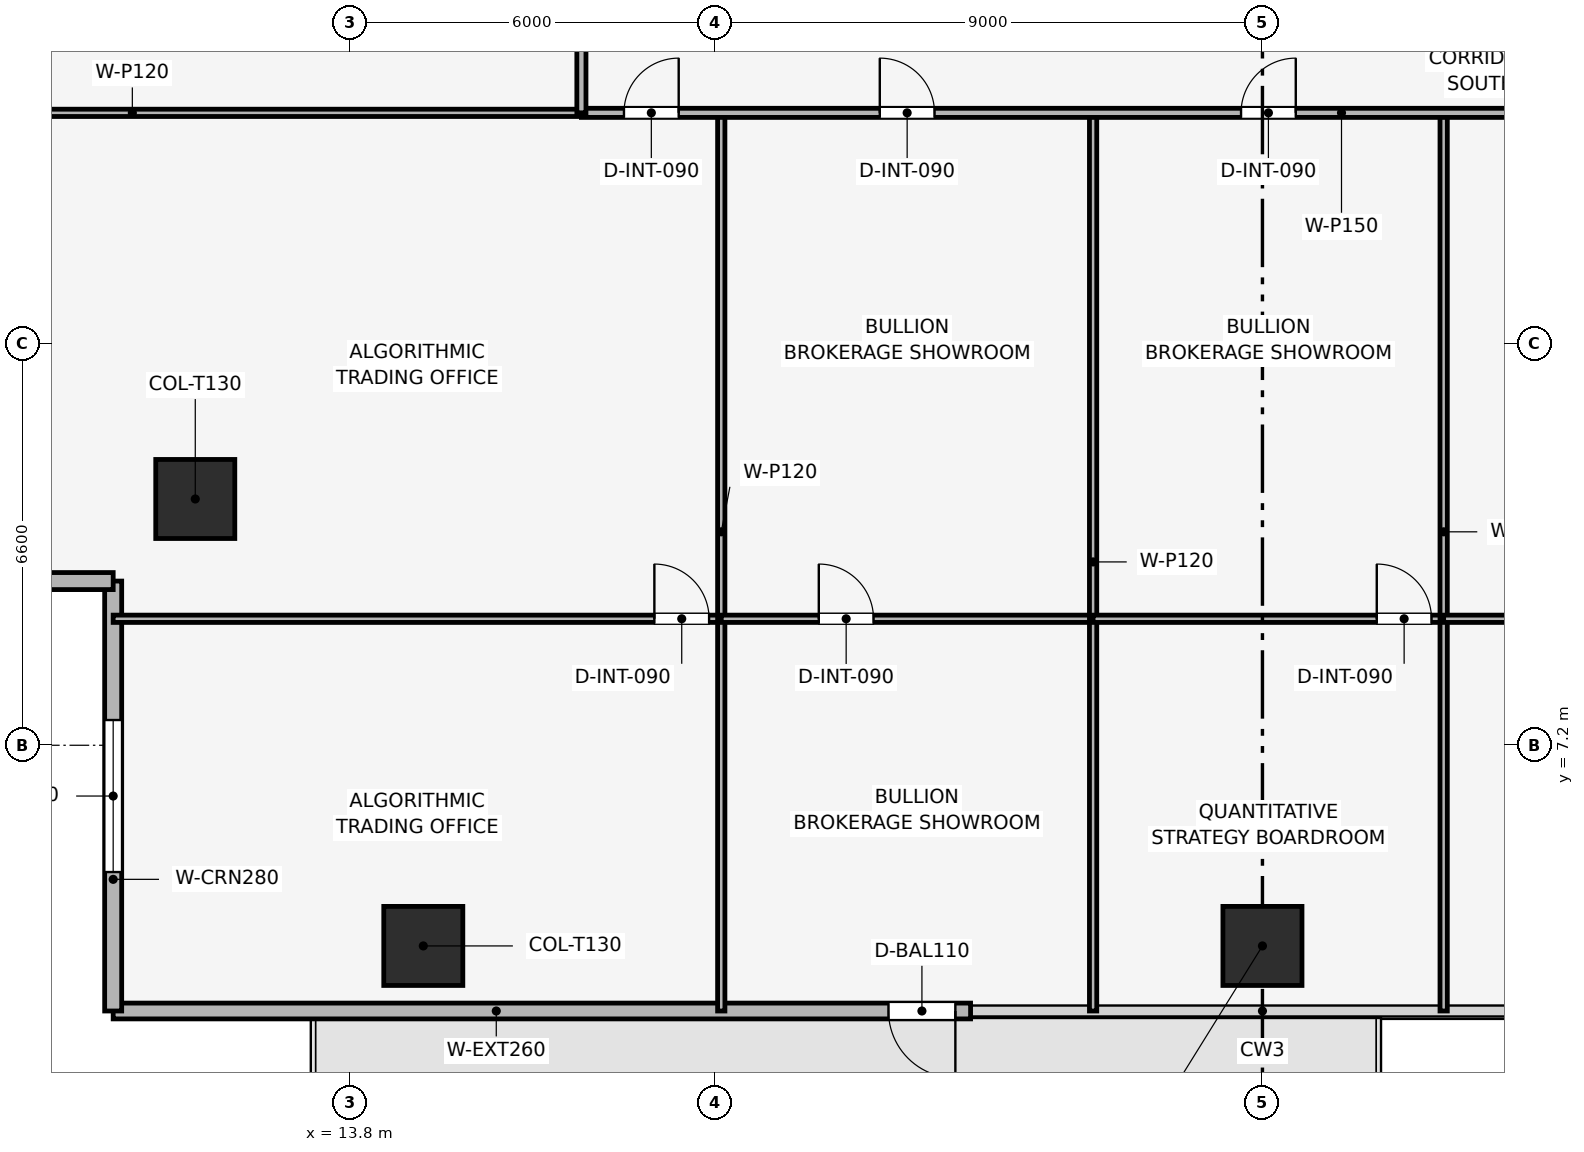
"""IFC4 building model, lengths in metres.
Left out: names, types, materials, properties, quantities, classifications, styles, units other than length and angle.
Written with IfcOpenShell. Run it as: python <this file> out.ifc"""

import sys

from ifc_helpers import new_model, si_unit, direction, frame, frame_2d, origin, origin_2d, place, context, subcontext, project, spatial, rectangle, extrude, element, fill, save


model = new_model("IFC4")
c1 = context("Model", 3, precision=1e-05, world=origin(), true_north=direction((0.0, 1.0)))
c2 = subcontext(c1, "Body", "Model", "MODEL_VIEW")
j1 = project(units=[si_unit("LENGTHUNIT", "METRE"), si_unit("PLANEANGLEUNIT", "RADIAN")], contexts=[c1])
p1 = place(None, origin())
s1 = spatial("IfcSite", under=j1, at=p1, CompositionType="ELEMENT")
p2 = place(p1, origin())
s2 = spatial("IfcBuilding", under=s1, at=p2, CompositionType="ELEMENT")
p3 = place(p2, frame((0.0, 0.0, 125.1)))
s3 = spatial("IfcBuildingStorey", under=s2, at=p3, CompositionType="ELEMENT", Elevation=125.1)
for number, where, z_axis, x_axis in (
    (1, (15.0, 3.9, 0.003), (0.0, 0.0, 1.0), (1.0, 0.0, 0.0)),
    (2, (28.8, 3.9, 0.003), (0.0, 0.0, 1.0), (1.0, 0.0, 0.0)),
    (3, (11.25, 11.25, 0.003), (0.0, 0.0, 1.0), (1.0, 0.0, 0.0)),
):
    element("IfcColumn", number, at=place(p3, frame(where, z_axis=z_axis, x_axis=x_axis)), inside=s3, PredefinedType="COLUMN", context=c2, shape_type="SweptSolid", body=[
        extrude(rectangle(XDim=1.3, YDim=1.3, at=origin_2d()), origin(), (0.0, 0.0, 1.0), 3.644),
    ])
p4 = place(p3, frame((24.0, 2.83, 0.0), z_axis=(0.0, 0.0, 1.0), x_axis=(-1.0, 0.0, 0.0)))
e4 = element("IfcWall", 4, at=p4, inside=s3, PredefinedType="SOLIDWALL", context=c2, shape_type="SweptSolid", body=[
    extrude(rectangle(XDim=14.1, YDim=0.26, at=frame_2d((7.05, 0.0))), origin(), (0.0, 0.0, 1.0), 3.65),
])
p5 = place(p4, frame((0.25, 0.0, 0.0)))
e5 = element("IfcOpeningElement", 5, at=p5, cuts=e4, PredefinedType="OPENING", context=c2, shape_type="SweptSolid", body=[
    extrude(rectangle(XDim=1.1, YDim=2.2, at=frame_2d((0.55, 1.1))), frame((0.0, 0.14, 0.0), z_axis=(0.0, -1.0, 0.0), x_axis=(1.0, 0.0, 0.0)), (0.0, 0.0, 1.0), 0.28),
])
p6 = place(p3, frame((9.9, 2.83, 0.0), z_axis=(0.0, 0.0, 1.0), x_axis=(0.0, 1.0, 0.0)))
e6 = element("IfcWall", 6, at=p6, inside=s3, PredefinedType="SOLIDWALL", context=c2, shape_type="SweptSolid", body=[
    extrude(rectangle(XDim=7.07, YDim=0.28, at=frame_2d((3.535, 0.0))), origin(), (0.0, 0.0, 1.0), 3.65),
])
p7 = place(p6, frame((2.285, 0.0, 0.9)))
e7 = element("IfcOpeningElement", 7, at=p7, cuts=e6, PredefinedType="OPENING", context=c2, shape_type="SweptSolid", body=[
    extrude(rectangle(XDim=2.5, YDim=1.9, at=frame_2d((1.25, 0.95))), frame((0.0, 0.15, 0.0), z_axis=(0.0, -1.0, 0.0), x_axis=(1.0, 0.0, 0.0)), (0.0, 0.0, 1.0), 0.3),
])
p8 = place(p3, frame((9.9, 9.9, 0.0), z_axis=(0.0, 0.0, 1.0), x_axis=(-1.0, 0.0, 0.0)))
e8 = element("IfcWall", 8, at=p8, inside=s3, PredefinedType="SOLIDWALL", context=c2, shape_type="SweptSolid", body=[
    extrude(rectangle(XDim=7.07, YDim=0.28, at=frame_2d((3.535, 0.0))), origin(), (0.0, 0.0, 1.0), 3.65),
])
p9 = place(p8, frame((2.285, 0.0, 0.9)))
e9 = element("IfcOpeningElement", 9, at=p9, cuts=e8, PredefinedType="OPENING", context=c2, shape_type="SweptSolid", body=[
    extrude(rectangle(XDim=2.5, YDim=1.9, at=frame_2d((1.25, 0.95))), frame((0.0, 0.15, 0.0), z_axis=(0.0, -1.0, 0.0), x_axis=(1.0, 0.0, 0.0)), (0.0, 0.0, 1.0), 0.3),
])
p10 = place(p3, frame((9.9, 9.28, 0.0), z_axis=(0.0, 0.0, 1.0), x_axis=(1.0, 0.0, 0.0)))
e10 = element("IfcWall", 10, at=p10, inside=s3, PredefinedType="PARTITIONING", context=c2, shape_type="SweptSolid", body=[
    extrude(rectangle(XDim=10.0, YDim=0.12, at=frame_2d((5.0, 0.0))), origin(), (0.0, 0.0, 1.0), 3.035),
])
p11 = place(p10, frame((8.9, 0.0, 0.0)))
e11 = element("IfcOpeningElement", 11, at=p11, cuts=e10, PredefinedType="OPENING", context=c2, shape_type="SweptSolid", body=[
    extrude(rectangle(XDim=0.9, YDim=2.1, at=frame_2d((0.45, 1.05))), frame((0.0, 0.07, 0.0), z_axis=(0.0, -1.0, 0.0), x_axis=(1.0, 0.0, 0.0)), (0.0, 0.0, 1.0), 0.14),
])
p12 = place(p3, frame((19.9, 2.83, 0.0), z_axis=(0.0, 0.0, 1.0), x_axis=(0.0, 1.0, 0.0)))
e12 = element("IfcWall", 12, at=p12, inside=s3, PredefinedType="PARTITIONING", context=c2, shape_type="SweptSolid", body=[
    extrude(rectangle(XDim=14.77, YDim=0.12, at=frame_2d((7.385, 0.0))), origin(), (0.0, 0.0, 1.0), 3.035),
])
p13 = place(p3, frame((19.9, 9.28, 0.0), z_axis=(0.0, 0.0, 1.0), x_axis=(1.0, 0.0, 0.0)))
e13 = element("IfcWall", 13, at=p13, inside=s3, PredefinedType="PARTITIONING", context=c2, shape_type="SweptSolid", body=[
    extrude(rectangle(XDim=6.115, YDim=0.12, at=frame_2d((3.058, 0.0))), origin(), (0.0, 0.0, 1.0), 3.185),
])
p14 = place(p13, frame((1.604, 0.0, 0.0)))
e14 = element("IfcOpeningElement", 14, at=p14, cuts=e13, PredefinedType="OPENING", context=c2, shape_type="SweptSolid", body=[
    extrude(rectangle(XDim=0.9, YDim=2.1, at=frame_2d((0.45, 1.05))), frame((0.0, 0.07, 0.0), z_axis=(0.0, -1.0, 0.0), x_axis=(1.0, 0.0, 0.0)), (0.0, 0.0, 1.0), 0.14),
])
p15 = place(p3, frame((26.015, 2.83, 0.0), z_axis=(0.0, 0.0, 1.0), x_axis=(0.0, 1.0, 0.0)))
e15 = element("IfcWall", 15, at=p15, inside=s3, PredefinedType="PARTITIONING", context=c2, shape_type="SweptSolid", body=[
    extrude(rectangle(XDim=14.77, YDim=0.12, at=frame_2d((7.385, 0.0))), origin(), (0.0, 0.0, 1.0), 3.035),
])
p16 = place(p3, frame((26.015, 9.28, 0.0), z_axis=(0.0, 0.0, 1.0), x_axis=(1.0, 0.0, 0.0)))
e16 = element("IfcWall", 16, at=p16, inside=s3, PredefinedType="PARTITIONING", context=c2, shape_type="SweptSolid", body=[
    extrude(rectangle(XDim=5.765, YDim=0.12, at=frame_2d((2.883, 0.0))), origin(), (0.0, 0.0, 1.0), 3.185),
])
p17 = place(p16, frame((4.665, 0.0, 0.0)))
e17 = element("IfcOpeningElement", 17, at=p17, cuts=e16, PredefinedType="OPENING", context=c2, shape_type="SweptSolid", body=[
    extrude(rectangle(XDim=0.9, YDim=2.1, at=frame_2d((0.45, 1.05))), frame((0.0, 0.07, 0.0), z_axis=(0.0, -1.0, 0.0), x_axis=(1.0, 0.0, 0.0)), (0.0, 0.0, 1.0), 0.14),
])
p18 = place(p3, frame((31.78, 2.83, 0.0), z_axis=(0.0, 0.0, 1.0), x_axis=(0.0, 1.0, 0.0)))
e18 = element("IfcWall", 18, at=p18, inside=s3, PredefinedType="PARTITIONING", context=c2, shape_type="SweptSolid", body=[
    extrude(rectangle(XDim=14.77, YDim=0.12, at=frame_2d((7.385, 0.0))), origin(), (0.0, 0.0, 1.0), 3.035),
])
p19 = place(p3, frame((31.78, 9.28, 0.0), z_axis=(0.0, 0.0, 1.0), x_axis=(1.0, 0.0, 0.0)))
e19 = element("IfcWall", 19, at=p19, inside=s3, PredefinedType="PARTITIONING", context=c2, shape_type="SweptSolid", body=[
    extrude(rectangle(XDim=15.92, YDim=0.12, at=frame_2d((7.96, 0.0))), origin(), (0.0, 0.0, 1.0), 3.035),
])
p20 = place(p19, frame((3.246, 0.0, 0.0)))
e20 = element("IfcOpeningElement", 20, at=p20, cuts=e19, PredefinedType="OPENING", context=c2, shape_type="SweptSolid", body=[
    extrude(rectangle(XDim=0.9, YDim=2.1, at=frame_2d((0.45, 1.05))), frame((0.0, 0.07, 0.0), z_axis=(0.0, -1.0, 0.0), x_axis=(1.0, 0.0, 0.0)), (0.0, 0.0, 1.0), 0.14),
])
p21 = place(p3, frame((2.83, 17.6, 0.0), z_axis=(0.0, 0.0, 1.0), x_axis=(1.0, 0.0, 0.0)))
e21 = element("IfcWall", 21, at=p21, inside=s3, PredefinedType="PARTITIONING", context=c2, shape_type="SweptSolid", body=[
    extrude(rectangle(XDim=14.77, YDim=0.12, at=frame_2d((7.385, 0.0))), origin(), (0.0, 0.0, 1.0), 3.035),
])
p22 = place(p3, frame((17.6, 17.6, 0.0), z_axis=(0.0, 0.0, 1.0), x_axis=(1.0, 0.0, 0.0)))
e22 = element("IfcWall", 22, at=p22, inside=s3, PredefinedType="PARTITIONING", context=c2, shape_type="SweptSolid", body=[
    extrude(rectangle(XDim=22.4, YDim=0.15, at=frame_2d((11.2, 0.0))), origin(), (0.0, 0.0, 1.0), 3.185),
])
p23 = place(p22, frame((0.7, 0.0, 0.0)))
e23 = element("IfcOpeningElement", 23, at=p23, cuts=e22, PredefinedType="OPENING", context=c2, shape_type="SweptSolid", body=[
    extrude(rectangle(XDim=0.9, YDim=2.1, at=frame_2d((0.45, 1.05))), frame((0.0, 0.085, 0.0), z_axis=(0.0, -1.0, 0.0), x_axis=(1.0, 0.0, 0.0)), (0.0, 0.0, 1.0), 0.17),
])
p24 = place(p22, frame((4.907, 0.0, 0.0)))
e24 = element("IfcOpeningElement", 24, at=p24, cuts=e22, PredefinedType="OPENING", context=c2, shape_type="SweptSolid", body=[
    extrude(rectangle(XDim=0.9, YDim=2.1, at=frame_2d((0.45, 1.05))), frame((0.0, 0.085, 0.0), z_axis=(0.0, -1.0, 0.0), x_axis=(1.0, 0.0, 0.0)), (0.0, 0.0, 1.0), 0.17),
])
p25 = place(p22, frame((10.848, 0.0, 0.0)))
e25 = element("IfcOpeningElement", 25, at=p25, cuts=e22, PredefinedType="OPENING", context=c2, shape_type="SweptSolid", body=[
    extrude(rectangle(XDim=0.9, YDim=2.1, at=frame_2d((0.45, 1.05))), frame((0.0, 0.085, 0.0), z_axis=(0.0, -1.0, 0.0), x_axis=(1.0, 0.0, 0.0)), (0.0, 0.0, 1.0), 0.17),
])
p26 = place(p22, frame((17.84, 0.0, 0.0)))
e26 = element("IfcOpeningElement", 26, at=p26, cuts=e22, PredefinedType="OPENING", context=c2, shape_type="SweptSolid", body=[
    extrude(rectangle(XDim=0.9, YDim=2.1, at=frame_2d((0.45, 1.05))), frame((0.0, 0.085, 0.0), z_axis=(0.0, -1.0, 0.0), x_axis=(1.0, 0.0, 0.0)), (0.0, 0.0, 1.0), 0.17),
])
p27 = place(p3, frame((17.6, 17.6, 0.0), z_axis=(0.0, 0.0, 1.0), x_axis=(0.0, 1.0, 0.0)))
e27 = element("IfcWall", 27, at=p27, inside=s3, PredefinedType="PARTITIONING", context=c2, shape_type="SweptSolid", body=[
    extrude(rectangle(XDim=22.4, YDim=0.15, at=frame_2d((11.2, 0.0))), origin(), (0.0, 0.0, 1.0), 3.185),
])
p28 = place(p27, frame((4.616, 0.0, 0.0)))
e28 = element("IfcOpeningElement", 28, at=p28, cuts=e27, PredefinedType="OPENING", context=c2, shape_type="SweptSolid", body=[
    extrude(rectangle(XDim=0.9, YDim=2.1, at=frame_2d((0.45, 1.05))), frame((0.0, 0.085, 0.0), z_axis=(0.0, -1.0, 0.0), x_axis=(1.0, 0.0, 0.0)), (0.0, 0.0, 1.0), 0.17),
])
p29 = place(p27, frame((15.816, 0.0, 0.0)))
e29 = element("IfcOpeningElement", 29, at=p29, cuts=e27, PredefinedType="OPENING", context=c2, shape_type="SweptSolid", body=[
    extrude(rectangle(XDim=0.9, YDim=2.1, at=frame_2d((0.45, 1.05))), frame((0.0, 0.085, 0.0), z_axis=(0.0, -1.0, 0.0), x_axis=(1.0, 0.0, 0.0)), (0.0, 0.0, 1.0), 0.17),
])
p30 = place(p5, origin())
e30 = element("IfcDoor", 30, at=p30, inside=s3, OperationType="SINGLE_SWING_LEFT", PredefinedType="DOOR", context=c2, shape_type="SweptSolid", body=[
    extrude(rectangle(XDim=1.1, YDim=2.2, at=frame_2d((0.55, 1.1))), frame((0.0, 0.025, 0.0), z_axis=(0.0, -1.0, 0.0), x_axis=(1.0, 0.0, 0.0)), (0.0, 0.0, 1.0), 0.05),
])
fill(e5, e30)
p31 = place(p7, origin())
e31 = element("IfcWindow", 31, at=p31, inside=s3, PartitioningType="SINGLE_PANEL", PredefinedType="WINDOW", context=c2, shape_type="SweptSolid", body=[
    extrude(rectangle(XDim=2.5, YDim=1.9, at=frame_2d((1.25, 0.95))), frame((0.0, 0.03, 0.0), z_axis=(0.0, -1.0, 0.0), x_axis=(1.0, 0.0, 0.0)), (0.0, 0.0, 1.0), 0.06),
])
fill(e7, e31)
p32 = place(p11, origin())
e32 = element("IfcDoor", 32, at=p32, inside=s3, OperationType="SINGLE_SWING_LEFT", PredefinedType="DOOR", context=c2, shape_type="SweptSolid", body=[
    extrude(rectangle(XDim=0.9, YDim=2.1, at=frame_2d((0.45, 1.05))), frame((0.0, 0.025, 0.0), z_axis=(0.0, -1.0, 0.0), x_axis=(1.0, 0.0, 0.0)), (0.0, 0.0, 1.0), 0.05),
])
fill(e11, e32)
p33 = place(p14, origin())
e33 = element("IfcDoor", 33, at=p33, inside=s3, OperationType="SINGLE_SWING_LEFT", PredefinedType="DOOR", context=c2, shape_type="SweptSolid", body=[
    extrude(rectangle(XDim=0.9, YDim=2.1, at=frame_2d((0.45, 1.05))), frame((0.0, 0.025, 0.0), z_axis=(0.0, -1.0, 0.0), x_axis=(1.0, 0.0, 0.0)), (0.0, 0.0, 1.0), 0.05),
])
fill(e14, e33)
p34 = place(p17, origin())
e34 = element("IfcDoor", 34, at=p34, inside=s3, OperationType="SINGLE_SWING_LEFT", PredefinedType="DOOR", context=c2, shape_type="SweptSolid", body=[
    extrude(rectangle(XDim=0.9, YDim=2.1, at=frame_2d((0.45, 1.05))), frame((0.0, 0.025, 0.0), z_axis=(0.0, -1.0, 0.0), x_axis=(1.0, 0.0, 0.0)), (0.0, 0.0, 1.0), 0.05),
])
fill(e17, e34)
p35 = place(p23, origin())
e35 = element("IfcDoor", 35, at=p35, inside=s3, OperationType="SINGLE_SWING_RIGHT", PredefinedType="DOOR", context=c2, shape_type="SweptSolid", body=[
    extrude(rectangle(XDim=0.9, YDim=2.1, at=frame_2d((0.45, 1.05))), frame((0.0, 0.025, 0.0), z_axis=(0.0, -1.0, 0.0), x_axis=(1.0, 0.0, 0.0)), (0.0, 0.0, 1.0), 0.05),
])
fill(e23, e35)
p36 = place(p24, origin())
e36 = element("IfcDoor", 36, at=p36, inside=s3, OperationType="SINGLE_SWING_LEFT", PredefinedType="DOOR", context=c2, shape_type="SweptSolid", body=[
    extrude(rectangle(XDim=0.9, YDim=2.1, at=frame_2d((0.45, 1.05))), frame((0.0, 0.025, 0.0), z_axis=(0.0, -1.0, 0.0), x_axis=(1.0, 0.0, 0.0)), (0.0, 0.0, 1.0), 0.05),
])
fill(e24, e36)
p37 = place(p25, origin())
e37 = element("IfcDoor", 37, at=p37, inside=s3, OperationType="SINGLE_SWING_RIGHT", PredefinedType="DOOR", context=c2, shape_type="SweptSolid", body=[
    extrude(rectangle(XDim=0.9, YDim=2.1, at=frame_2d((0.45, 1.05))), frame((0.0, 0.025, 0.0), z_axis=(0.0, -1.0, 0.0), x_axis=(1.0, 0.0, 0.0)), (0.0, 0.0, 1.0), 0.05),
])
fill(e25, e37)
save(model, sys.argv[1])
